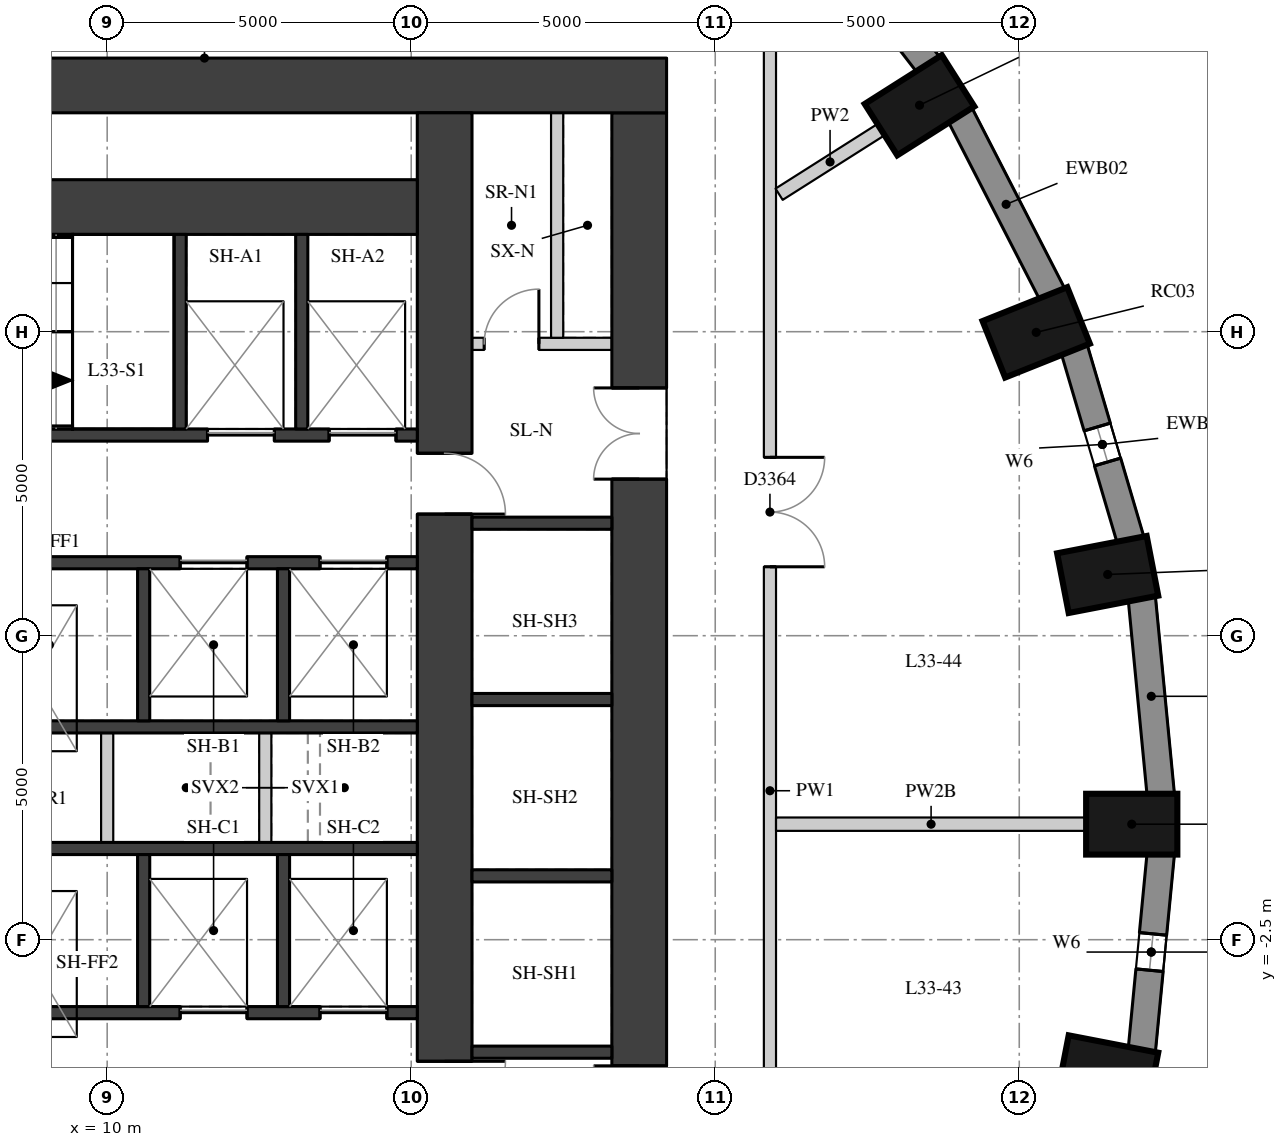
"""IFC4 building model, lengths in metres.
Left out: names, types, materials, properties, quantities, classifications, styles, units other than length and angle.
Written with IfcOpenShell. Run it as: python <this file> out.ifc"""

import sys

from ifc_helpers import new_model, si_unit, direction, frame, frame_2d, origin, origin_2d, place, context, subcontext, project, spatial, rectangle, extrude, element, fill, save


model = new_model("IFC4")
c1 = context("Model", 3, precision=1e-05, world=origin(), true_north=direction((0.0, 1.0)))
c2 = subcontext(c1, "Body", "Model", "MODEL_VIEW")
j1 = project(units=[si_unit("LENGTHUNIT", "METRE"), si_unit("PLANEANGLEUNIT", "RADIAN")], contexts=[c1])
p1 = place(None, origin())
s1 = spatial("IfcSite", under=j1, at=p1, CompositionType="ELEMENT")
p2 = place(p1, origin())
s2 = spatial("IfcBuilding", under=s1, at=p2, CompositionType="ELEMENT")
p3 = place(p2, frame((0.0, 0.0, 118.6)))
s3 = spatial("IfcBuildingStorey", under=s2, at=p3, CompositionType="ELEMENT", Elevation=118.6)
for number, where, z_axis, x_axis in (
    (1, (26.85, -0.6, 0.0), (0.0, 0.0, 1.0), (1.0, 0.0, 0.0)),
    (2, (26.454, 3.507, 0.0), (0.0, 0.0, 1.0), (0.982, 0.19, 0.0)),
    (3, (25.279, 7.489, 0.0), (0.0, 0.0, 1.0), (0.929, 0.371, 0.0)),
    (4, (23.36, 11.225, 0.0), (0.0, 0.0, 1.0), (0.845, 0.536, 0.0)),
    (5, (26.454, -4.707, 0.0), (0.0, 0.0, 1.0), (0.982, -0.19, 0.0)),
):
    element("IfcColumn", number, at=place(p3, frame(where, z_axis=z_axis, x_axis=x_axis)), inside=s3, PredefinedType="COLUMN", context=c2, shape_type="SweptSolid", body=[
        extrude(rectangle(XDim=1.5, YDim=1.0, at=origin_2d()), origin(), (0.0, 0.0, 1.0), 3.3),
    ])
p4 = place(p3, frame((27.328, -0.12, 0.0), z_axis=(0.0, 0.0, 1.0), x_axis=(-0.09589355735, 0.995391594127, 0.0)))
e6 = element("IfcWall", 6, at=p4, inside=s3, PredefinedType="SOLIDWALL", context=c2, shape_type="SweptSolid", body=[
    extrude(rectangle(XDim=3.261, YDim=0.45, at=frame_2d((1.631, 0.0))), origin(), (0.0, 0.0, 1.0), 3.02),
])
p5 = place(p3, frame((26.832, 4.069, 0.0), z_axis=(0.0, 0.0, 1.0), x_axis=(-0.283002902729, 0.959119052593, 0.0)))
e7 = element("IfcWall", 7, at=p5, inside=s3, PredefinedType="SOLIDWALL", context=c2, shape_type="SweptSolid", body=[
    extrude(rectangle(XDim=3.286, YDim=0.45, at=frame_2d((1.643, 0.0))), origin(), (0.0, 0.0, 1.0), 3.02),
])
p6 = place(p5, frame((1.343, 0.0, 0.4)))
e8 = element("IfcOpeningElement", 8, at=p6, cuts=e7, PredefinedType="OPENING", context=c2, shape_type="SweptSolid", body=[
    extrude(rectangle(XDim=0.6, YDim=1.75, at=frame_2d((0.3, 0.875))), frame((0.0, 0.235, 0.0), z_axis=(0.0, -1.0, 0.0), x_axis=(1.0, 0.0, 0.0)), (0.0, 0.0, 1.0), 0.47),
])
p7 = place(p3, frame((25.545, 8.112, 0.0), z_axis=(0.0, 0.0, 1.0), x_axis=(-0.456828186229, 0.889554949549, 0.0)))
e9 = element("IfcWall", 9, at=p7, inside=s3, PredefinedType="SOLIDWALL", context=c2, shape_type="SweptSolid", body=[
    extrude(rectangle(XDim=3.333, YDim=0.45, at=frame_2d((1.667, 0.0))), origin(), (0.0, 0.0, 1.0), 3.02),
])
p8 = place(p3, frame((23.508, 11.887, 0.0), z_axis=(0.0, 0.0, 1.0), x_axis=(-0.610693945156, 0.791866721961, 0.0)))
e10 = element("IfcWall", 10, at=p8, inside=s3, PredefinedType="SOLIDWALL", context=c2, shape_type="SweptSolid", body=[
    extrude(rectangle(XDim=3.395, YDim=0.45, at=frame_2d((1.697, 0.0))), origin(), (0.0, 0.0, 1.0), 3.02),
])
p9 = place(p8, frame((1.397, 0.0, 0.4)))
e11 = element("IfcOpeningElement", 11, at=p9, cuts=e10, PredefinedType="OPENING", context=c2, shape_type="SweptSolid", body=[
    extrude(rectangle(XDim=0.6, YDim=1.75, at=frame_2d((0.3, 0.875))), frame((0.0, 0.235, 0.0), z_axis=(0.0, -1.0, 0.0), x_axis=(1.0, 0.0, 0.0)), (0.0, 0.0, 1.0), 0.47),
])
p10 = place(p3, frame((27.015, -4.326, 0.0), z_axis=(0.0, 0.0, 1.0), x_axis=(0.09589355735, 0.995391594127, 0.0)))
e12 = element("IfcWall", 12, at=p10, inside=s3, PredefinedType="SOLIDWALL", context=c2, shape_type="SweptSolid", body=[
    extrude(rectangle(XDim=3.261, YDim=0.45, at=frame_2d((1.631, 0.0))), origin(), (0.0, 0.0, 1.0), 3.02),
])
p11 = place(p10, frame((1.331, 0.0, 0.4)))
e13 = element("IfcOpeningElement", 13, at=p11, cuts=e12, PredefinedType="OPENING", context=c2, shape_type="SweptSolid", body=[
    extrude(rectangle(XDim=0.6, YDim=1.75, at=frame_2d((0.3, 0.875))), frame((0.0, 0.235, 0.0), z_axis=(0.0, -1.0, 0.0), x_axis=(1.0, 0.0, 0.0)), (0.0, 0.0, 1.0), 0.47),
])
p12 = place(p3, frame((18.75, -11.1, 0.0), z_axis=(0.0, 0.0, 1.0), x_axis=(0.0, 1.0, 0.0)))
e14 = element("IfcWall", 14, at=p12, inside=s3, PredefinedType="SHEAR", context=c2, shape_type="SweptSolid", body=[
    extrude(rectangle(XDim=22.2, YDim=0.9, at=frame_2d((11.1, 0.0))), origin(), (0.0, 0.0, 1.0), 3.02),
])
p13 = place(p12, frame((16.175, 0.0, 0.0)))
e15 = element("IfcOpeningElement", 15, at=p13, cuts=e14, PredefinedType="OPENING", context=c2, shape_type="SweptSolid", body=[
    extrude(rectangle(XDim=1.5, YDim=2.1, at=frame_2d((0.75, 1.05))), frame((0.0, 0.46, 0.0), z_axis=(0.0, -1.0, 0.0), x_axis=(1.0, 0.0, 0.0)), (0.0, 0.0, 1.0), 0.92),
])
p14 = place(p12, frame((5.025, 0.0, 0.0)))
e16 = element("IfcOpeningElement", 16, at=p14, cuts=e14, PredefinedType="OPENING", context=c2, shape_type="SweptSolid", body=[
    extrude(rectangle(XDim=1.5, YDim=2.1, at=frame_2d((0.75, 1.05))), frame((0.0, 0.46, 0.0), z_axis=(0.0, -1.0, 0.0), x_axis=(1.0, 0.0, 0.0)), (0.0, 0.0, 1.0), 0.92),
])
p15 = place(p3, frame((4.0, 11.55, 0.0), z_axis=(0.0, 0.0, 1.0), x_axis=(1.0, 0.0, 0.0)))
e17 = element("IfcWall", 17, at=p15, inside=s3, PredefinedType="SHEAR", context=c2, shape_type="SweptSolid", body=[
    extrude(rectangle(XDim=15.2, YDim=0.9, at=frame_2d((7.6, 0.0))), origin(), (0.0, 0.0, 1.0), 3.02),
])
p16 = place(p3, frame((15.55, -11.1, 0.0), z_axis=(0.0, 0.0, 1.0), x_axis=(0.0, 1.0, 0.0)))
e18 = element("IfcWall", 18, at=p16, inside=s3, PredefinedType="SHEAR", context=c2, shape_type="SweptSolid", body=[
    extrude(rectangle(XDim=22.2, YDim=0.9, at=frame_2d((11.1, 0.0))), origin(), (0.0, 0.0, 1.0), 3.02),
])
p17 = place(p16, frame((15.6, 0.0, 0.0)))
e19 = element("IfcOpeningElement", 19, at=p17, cuts=e18, PredefinedType="OPENING", context=c2, shape_type="SweptSolid", body=[
    extrude(rectangle(XDim=1.0, YDim=2.1, at=frame_2d((0.5, 1.05))), frame((0.0, 0.46, 0.0), z_axis=(0.0, -1.0, 0.0), x_axis=(1.0, 0.0, 0.0)), (0.0, 0.0, 1.0), 0.92),
])
p18 = place(p16, frame((5.6, 0.0, 0.0)))
e20 = element("IfcOpeningElement", 20, at=p18, cuts=e18, PredefinedType="OPENING", context=c2, shape_type="SweptSolid", body=[
    extrude(rectangle(XDim=1.0, YDim=2.1, at=frame_2d((0.5, 1.05))), frame((0.0, 0.46, 0.0), z_axis=(0.0, -1.0, 0.0), x_axis=(1.0, 0.0, 0.0)), (0.0, 0.0, 1.0), 0.92),
])
p19 = place(p3, frame((4.9, 9.55, 0.0), z_axis=(0.0, 0.0, 1.0), x_axis=(1.0, 0.0, 0.0)))
e21 = element("IfcWall", 21, at=p19, inside=s3, PredefinedType="SHEAR", context=c2, shape_type="SweptSolid", body=[
    extrude(rectangle(XDim=10.2, YDim=0.9, at=frame_2d((5.1, 0.0))), origin(), (0.0, 0.0, 1.0), 3.02),
])
p20 = place(p3, frame((4.9, 5.8, 0.0), z_axis=(0.0, 0.0, 1.0), x_axis=(1.0, 0.0, 0.0)))
e22 = element("IfcWall", 22, at=p20, inside=s3, PredefinedType="SHEAR", context=c2, shape_type="SweptSolid", body=[
    extrude(rectangle(XDim=10.2, YDim=0.2, at=frame_2d((5.1, 0.0))), origin(), (0.0, 0.0, 1.0), 3.02),
])
p21 = place(p20, frame((6.75, 0.0, 0.0)))
e23 = element("IfcOpeningElement", 23, at=p21, cuts=e22, PredefinedType="OPENING", context=c2, shape_type="SweptSolid", body=[
    extrude(rectangle(XDim=1.1, YDim=2.1, at=frame_2d((0.55, 1.05))), frame((0.0, 0.11, 0.0), z_axis=(0.0, -1.0, 0.0), x_axis=(1.0, 0.0, 0.0)), (0.0, 0.0, 1.0), 0.22),
])
p22 = place(p20, frame((8.75, 0.0, 0.0)))
e24 = element("IfcOpeningElement", 24, at=p22, cuts=e22, PredefinedType="OPENING", context=c2, shape_type="SweptSolid", body=[
    extrude(rectangle(XDim=1.1, YDim=2.1, at=frame_2d((0.55, 1.05))), frame((0.0, 0.11, 0.0), z_axis=(0.0, -1.0, 0.0), x_axis=(1.0, 0.0, 0.0)), (0.0, 0.0, 1.0), 0.22),
])
p23 = place(p3, frame((4.9, 3.7, 0.0), z_axis=(0.0, 0.0, 1.0), x_axis=(1.0, 0.0, 0.0)))
e25 = element("IfcWall", 25, at=p23, inside=s3, PredefinedType="SHEAR", context=c2, shape_type="SweptSolid", body=[
    extrude(rectangle(XDim=10.2, YDim=0.2, at=frame_2d((5.1, 0.0))), origin(), (0.0, 0.0, 1.0), 3.02),
])
p24 = place(p23, frame((6.3, 0.0, 0.0)))
e26 = element("IfcOpeningElement", 26, at=p24, cuts=e25, PredefinedType="OPENING", context=c2, shape_type="SweptSolid", body=[
    extrude(rectangle(XDim=1.1, YDim=2.1, at=frame_2d((0.55, 1.05))), frame((0.0, 0.11, 0.0), z_axis=(0.0, -1.0, 0.0), x_axis=(1.0, 0.0, 0.0)), (0.0, 0.0, 1.0), 0.22),
])
p25 = place(p23, frame((8.6, 0.0, 0.0)))
e27 = element("IfcOpeningElement", 27, at=p25, cuts=e25, PredefinedType="OPENING", context=c2, shape_type="SweptSolid", body=[
    extrude(rectangle(XDim=1.1, YDim=2.1, at=frame_2d((0.55, 1.05))), frame((0.0, 0.11, 0.0), z_axis=(0.0, -1.0, 0.0), x_axis=(1.0, 0.0, 0.0)), (0.0, 0.0, 1.0), 0.22),
])
for number, where, z_axis, x_axis in (
    (28, (4.9, 1.0, 0.0), (0.0, 0.0, 1.0), (1.0, 0.0, 0.0)),
    (29, (4.9, -1.0, 0.0), (0.0, 0.0, 1.0), (1.0, 0.0, 0.0)),
):
    element("IfcWall", number, at=place(p3, frame(where, z_axis=z_axis, x_axis=x_axis)), inside=s3, PredefinedType="SHEAR", context=c2, shape_type="SweptSolid", body=[
        extrude(rectangle(XDim=10.2, YDim=0.2, at=frame_2d((5.1, 0.0))), origin(), (0.0, 0.0, 1.0), 3.02),
    ])
p26 = place(p3, frame((4.9, -3.7, 0.0), z_axis=(0.0, 0.0, 1.0), x_axis=(1.0, 0.0, 0.0)))
e30 = element("IfcWall", 30, at=p26, inside=s3, PredefinedType="SHEAR", context=c2, shape_type="SweptSolid", body=[
    extrude(rectangle(XDim=10.2, YDim=0.2, at=frame_2d((5.1, 0.0))), origin(), (0.0, 0.0, 1.0), 3.02),
])
p27 = place(p26, frame((6.3, 0.0, 0.0)))
e31 = element("IfcOpeningElement", 31, at=p27, cuts=e30, PredefinedType="OPENING", context=c2, shape_type="SweptSolid", body=[
    extrude(rectangle(XDim=1.1, YDim=2.1, at=frame_2d((0.55, 1.05))), frame((0.0, 0.11, 0.0), z_axis=(0.0, -1.0, 0.0), x_axis=(1.0, 0.0, 0.0)), (0.0, 0.0, 1.0), 0.22),
])
p28 = place(p26, frame((8.6, 0.0, 0.0)))
e32 = element("IfcOpeningElement", 32, at=p28, cuts=e30, PredefinedType="OPENING", context=c2, shape_type="SweptSolid", body=[
    extrude(rectangle(XDim=1.1, YDim=2.1, at=frame_2d((0.55, 1.05))), frame((0.0, 0.11, 0.0), z_axis=(0.0, -1.0, 0.0), x_axis=(1.0, 0.0, 0.0)), (0.0, 0.0, 1.0), 0.22),
])
for number, where, z_axis, x_axis in (
    (33, (11.2, 5.9, 0.0), (0.0, 0.0, 1.0), (0.0, 1.0, 0.0)),
    (34, (13.2, 5.9, 0.0), (0.0, 0.0, 1.0), (0.0, 1.0, 0.0)),
):
    element("IfcWall", number, at=place(p3, frame(where, z_axis=z_axis, x_axis=x_axis)), inside=s3, PredefinedType="SHEAR", context=c2, shape_type="SweptSolid", body=[
        extrude(rectangle(XDim=3.2, YDim=0.2, at=frame_2d((1.6, 0.0))), origin(), (0.0, 0.0, 1.0), 3.02),
    ])
for number, where, z_axis, x_axis in (
    (35, (10.6, 1.1, 0.0), (0.0, 0.0, 1.0), (0.0, 1.0, 0.0)),
    (36, (10.6, -3.6, 0.0), (0.0, 0.0, 1.0), (0.0, 1.0, 0.0)),
    (37, (12.9, 1.1, 0.0), (0.0, 0.0, 1.0), (0.0, 1.0, 0.0)),
    (38, (12.9, -3.6, 0.0), (0.0, 0.0, 1.0), (0.0, 1.0, 0.0)),
):
    element("IfcWall", number, at=place(p3, frame(where, z_axis=z_axis, x_axis=x_axis)), inside=s3, PredefinedType="SHEAR", context=c2, shape_type="SweptSolid", body=[
        extrude(rectangle(XDim=2.5, YDim=0.2, at=frame_2d((1.25, 0.0))), origin(), (0.0, 0.0, 1.0), 3.02),
    ])
for number, where, z_axis, x_axis in (
    (39, (10.0, -0.9, 0.0), (0.0, 0.0, 1.0), (0.0, 1.0, 0.0)),
    (40, (12.6, -0.9, 0.0), (0.0, 0.0, 1.0), (0.0, 1.0, 0.0)),
):
    element("IfcWall", number, at=place(p3, frame(where, z_axis=z_axis, x_axis=x_axis)), inside=s3, PredefinedType="PARTITIONING", context=c2, shape_type="SweptSolid", body=[
        extrude(rectangle(XDim=1.8, YDim=0.2, at=frame_2d((0.9, 0.0))), origin(), (0.0, 0.0, 1.0), 3.02),
    ])
for number, where, z_axis, x_axis in (
    (41, (16.0, -4.35, 0.0), (0.0, 0.0, 1.0), (1.0, 0.0, 0.0)),
    (42, (16.0, -1.45, 0.0), (0.0, 0.0, 1.0), (1.0, 0.0, 0.0)),
    (43, (16.0, 1.45, 0.0), (0.0, 0.0, 1.0), (1.0, 0.0, 0.0)),
    (44, (16.0, 4.35, 0.0), (0.0, 0.0, 1.0), (1.0, 0.0, 0.0)),
):
    element("IfcWall", number, at=place(p3, frame(where, z_axis=z_axis, x_axis=x_axis)), inside=s3, PredefinedType="SHEAR", context=c2, shape_type="SweptSolid", body=[
        extrude(rectangle(XDim=2.3, YDim=0.2, at=frame_2d((1.15, 0.0))), origin(), (0.0, 0.0, 1.0), 3.02),
    ])
p29 = place(p3, frame((16.0, 7.3, 0.0), z_axis=(0.0, 0.0, 1.0), x_axis=(1.0, 0.0, 0.0)))
e45 = element("IfcWall", 45, at=p29, inside=s3, PredefinedType="PARTITIONING", context=c2, shape_type="SweptSolid", body=[
    extrude(rectangle(XDim=2.3, YDim=0.2, at=frame_2d((1.15, 0.0))), origin(), (0.0, 0.0, 1.0), 3.02),
])
p30 = place(p29, frame((0.2, 0.0, 0.0)))
e46 = element("IfcOpeningElement", 46, at=p30, cuts=e45, PredefinedType="OPENING", context=c2, shape_type="SweptSolid", body=[
    extrude(rectangle(XDim=0.9, YDim=2.1, at=frame_2d((0.45, 1.05))), frame((0.0, 0.11, 0.0), z_axis=(0.0, -1.0, 0.0), x_axis=(1.0, 0.0, 0.0)), (0.0, 0.0, 1.0), 0.22),
])
p31 = place(p3, frame((17.4, 7.4, 0.0), z_axis=(0.0, 0.0, 1.0), x_axis=(0.0, 1.0, 0.0)))
e47 = element("IfcWall", 47, at=p31, inside=s3, PredefinedType="PARTITIONING", context=c2, shape_type="SweptSolid", body=[
    extrude(rectangle(XDim=3.7, YDim=0.2, at=frame_2d((1.85, 0.0))), origin(), (0.0, 0.0, 1.0), 3.02),
])
p32 = place(p3, frame((20.9, 13.6, 0.0), z_axis=(0.0, 0.0, 1.0), x_axis=(0.0, -1.0, 0.0)))
e48 = element("IfcWall", 48, at=p32, inside=s3, PredefinedType="PARTITIONING", context=c2, shape_type="SweptSolid", body=[
    extrude(rectangle(XDim=27.3, YDim=0.2, at=frame_2d((13.65, 0.0))), origin(), (0.0, 0.0, 1.0), 3.02),
])
p33 = place(p32, frame((18.433, 0.0, 0.0)))
e49 = element("IfcOpeningElement", 49, at=p33, cuts=e48, PredefinedType="OPENING", context=c2, shape_type="SweptSolid", body=[
    extrude(rectangle(XDim=1.8, YDim=2.1, at=frame_2d((0.9, 1.05))), frame((0.0, 0.11, 0.0), z_axis=(0.0, -1.0, 0.0), x_axis=(1.0, 0.0, 0.0)), (0.0, 0.0, 1.0), 0.22),
])
p34 = place(p32, frame((8.167, 0.0, 0.0)))
e50 = element("IfcOpeningElement", 50, at=p34, cuts=e48, PredefinedType="OPENING", context=c2, shape_type="SweptSolid", body=[
    extrude(rectangle(XDim=1.8, YDim=2.1, at=frame_2d((0.9, 1.05))), frame((0.0, 0.11, 0.0), z_axis=(0.0, -1.0, 0.0), x_axis=(1.0, 0.0, 0.0)), (0.0, 0.0, 1.0), 0.22),
])
p35 = place(p3, frame((26.1, -0.6, 0.0), z_axis=(0.0, 0.0, 1.0), x_axis=(-1.0, 0.0, 0.0)))
e51 = element("IfcWall", 51, at=p35, inside=s3, PredefinedType="PARTITIONING", context=c2, shape_type="SweptSolid", body=[
    extrude(rectangle(XDim=5.1, YDim=0.22, at=frame_2d((2.55, 0.0))), origin(), (0.0, 0.0, 1.0), 2.57),
])
p36 = place(p3, frame((22.727, 10.823, 0.0), z_axis=(0.0, 0.0, 1.0), x_axis=(-0.844587282199, -0.535417895431, 0.0)))
e52 = element("IfcWall", 52, at=p36, inside=s3, PredefinedType="PARTITIONING", context=c2, shape_type="SweptSolid", body=[
    extrude(rectangle(XDim=1.984, YDim=0.22, at=frame_2d((0.992, 0.0))), origin(), (0.0, 0.0, 1.0), 3.02),
])
p37 = place(p6, origin())
e53 = element("IfcWindow", 53, at=p37, inside=s3, PartitioningType="SINGLE_PANEL", PredefinedType="WINDOW", context=c2, shape_type="SweptSolid", body=[
    extrude(rectangle(XDim=0.6, YDim=1.75, at=frame_2d((0.3, 0.875))), frame((0.0, 0.035, 0.0), z_axis=(0.0, -1.0, 0.0), x_axis=(1.0, 0.0, 0.0)), (0.0, 0.0, 1.0), 0.06),
])
fill(e8, e53)
p38 = place(p11, origin())
e54 = element("IfcWindow", 54, at=p38, inside=s3, PartitioningType="SINGLE_PANEL", PredefinedType="WINDOW", context=c2, shape_type="SweptSolid", body=[
    extrude(rectangle(XDim=0.6, YDim=1.75, at=frame_2d((0.3, 0.875))), frame((0.0, 0.035, 0.0), z_axis=(0.0, -1.0, 0.0), x_axis=(1.0, 0.0, 0.0)), (0.0, 0.0, 1.0), 0.06),
])
fill(e13, e54)
p39 = place(p13, origin())
e55 = element("IfcDoor", 55, at=p39, inside=s3, OperationType="DOUBLE_DOOR_SINGLE_SWING", PredefinedType="DOOR", context=c2, shape_type="SweptSolid", body=[
    extrude(rectangle(XDim=1.5, YDim=2.1, at=frame_2d((0.75, 1.05))), frame((0.0, 0.025, 0.0), z_axis=(0.0, -1.0, 0.0), x_axis=(1.0, 0.0, 0.0)), (0.0, 0.0, 1.0), 0.05),
])
fill(e15, e55)
p40 = place(p14, origin())
e56 = element("IfcDoor", 56, at=p40, inside=s3, OperationType="DOUBLE_DOOR_SINGLE_SWING", PredefinedType="DOOR", context=c2, shape_type="SweptSolid", body=[
    extrude(rectangle(XDim=1.5, YDim=2.1, at=frame_2d((0.75, 1.05))), frame((0.0, 0.025, 0.0), z_axis=(0.0, -1.0, 0.0), x_axis=(1.0, 0.0, 0.0)), (0.0, 0.0, 1.0), 0.05),
])
fill(e16, e56)
p41 = place(p21, origin())
e57 = element("IfcDoor", 57, at=p41, inside=s3, OperationType="DOUBLE_DOOR_SLIDING", PredefinedType="DOOR", context=c2, shape_type="SweptSolid", body=[
    extrude(rectangle(XDim=1.1, YDim=2.1, at=frame_2d((0.55, 1.05))), frame((0.0, 0.025, 0.0), z_axis=(0.0, -1.0, 0.0), x_axis=(1.0, 0.0, 0.0)), (0.0, 0.0, 1.0), 0.05),
])
fill(e23, e57)
p42 = place(p22, origin())
e58 = element("IfcDoor", 58, at=p42, inside=s3, OperationType="DOUBLE_DOOR_SLIDING", PredefinedType="DOOR", context=c2, shape_type="SweptSolid", body=[
    extrude(rectangle(XDim=1.1, YDim=2.1, at=frame_2d((0.55, 1.05))), frame((0.0, 0.025, 0.0), z_axis=(0.0, -1.0, 0.0), x_axis=(1.0, 0.0, 0.0)), (0.0, 0.0, 1.0), 0.05),
])
fill(e24, e58)
p43 = place(p24, origin())
e59 = element("IfcDoor", 59, at=p43, inside=s3, OperationType="DOUBLE_DOOR_SLIDING", PredefinedType="DOOR", context=c2, shape_type="SweptSolid", body=[
    extrude(rectangle(XDim=1.1, YDim=2.1, at=frame_2d((0.55, 1.05))), frame((0.0, 0.025, 0.0), z_axis=(0.0, -1.0, 0.0), x_axis=(1.0, 0.0, 0.0)), (0.0, 0.0, 1.0), 0.05),
])
fill(e26, e59)
p44 = place(p25, origin())
e60 = element("IfcDoor", 60, at=p44, inside=s3, OperationType="DOUBLE_DOOR_SLIDING", PredefinedType="DOOR", context=c2, shape_type="SweptSolid", body=[
    extrude(rectangle(XDim=1.1, YDim=2.1, at=frame_2d((0.55, 1.05))), frame((0.0, 0.025, 0.0), z_axis=(0.0, -1.0, 0.0), x_axis=(1.0, 0.0, 0.0)), (0.0, 0.0, 1.0), 0.05),
])
fill(e27, e60)
p45 = place(p27, origin())
e61 = element("IfcDoor", 61, at=p45, inside=s3, OperationType="DOUBLE_DOOR_SLIDING", PredefinedType="DOOR", context=c2, shape_type="SweptSolid", body=[
    extrude(rectangle(XDim=1.1, YDim=2.1, at=frame_2d((0.55, 1.05))), frame((0.0, 0.025, 0.0), z_axis=(0.0, -1.0, 0.0), x_axis=(1.0, 0.0, 0.0)), (0.0, 0.0, 1.0), 0.05),
])
fill(e31, e61)
p46 = place(p28, origin())
e62 = element("IfcDoor", 62, at=p46, inside=s3, OperationType="DOUBLE_DOOR_SLIDING", PredefinedType="DOOR", context=c2, shape_type="SweptSolid", body=[
    extrude(rectangle(XDim=1.1, YDim=2.1, at=frame_2d((0.55, 1.05))), frame((0.0, 0.025, 0.0), z_axis=(0.0, -1.0, 0.0), x_axis=(1.0, 0.0, 0.0)), (0.0, 0.0, 1.0), 0.05),
])
fill(e32, e62)
p47 = place(p17, origin())
e63 = element("IfcDoor", 63, at=p47, inside=s3, OperationType="SINGLE_SWING_RIGHT", PredefinedType="DOOR", context=c2, shape_type="SweptSolid", body=[
    extrude(rectangle(XDim=1.0, YDim=2.1, at=frame_2d((0.5, 1.05))), frame((0.0, 0.025, 0.0), z_axis=(0.0, -1.0, 0.0), x_axis=(1.0, 0.0, 0.0)), (0.0, 0.0, 1.0), 0.05),
])
fill(e19, e63)
p48 = place(p30, origin())
e64 = element("IfcDoor", 64, at=p48, inside=s3, OperationType="SINGLE_SWING_RIGHT", PredefinedType="DOOR", context=c2, shape_type="SweptSolid", body=[
    extrude(rectangle(XDim=0.9, YDim=2.1, at=frame_2d((0.45, 1.05))), frame((0.0, 0.025, 0.0), z_axis=(0.0, -1.0, 0.0), x_axis=(1.0, 0.0, 0.0)), (0.0, 0.0, 1.0), 0.05),
])
fill(e46, e64)
p49 = place(p18, origin())
e65 = element("IfcDoor", 65, at=p49, inside=s3, OperationType="SINGLE_SWING_LEFT", PredefinedType="DOOR", context=c2, shape_type="SweptSolid", body=[
    extrude(rectangle(XDim=1.0, YDim=2.1, at=frame_2d((0.5, 1.05))), frame((0.0, 0.025, 0.0), z_axis=(0.0, -1.0, 0.0), x_axis=(1.0, 0.0, 0.0)), (0.0, 0.0, 1.0), 0.05),
])
fill(e20, e65)
p50 = place(p34, origin())
e66 = element("IfcDoor", 66, at=p50, inside=s3, OperationType="DOUBLE_DOOR_SINGLE_SWING", PredefinedType="DOOR", context=c2, shape_type="SweptSolid", body=[
    extrude(rectangle(XDim=1.8, YDim=2.1, at=frame_2d((0.9, 1.05))), frame((0.0, 0.025, 0.0), z_axis=(0.0, -1.0, 0.0), x_axis=(1.0, 0.0, 0.0)), (0.0, 0.0, 1.0), 0.05),
])
fill(e50, e66)
save(model, sys.argv[1])
